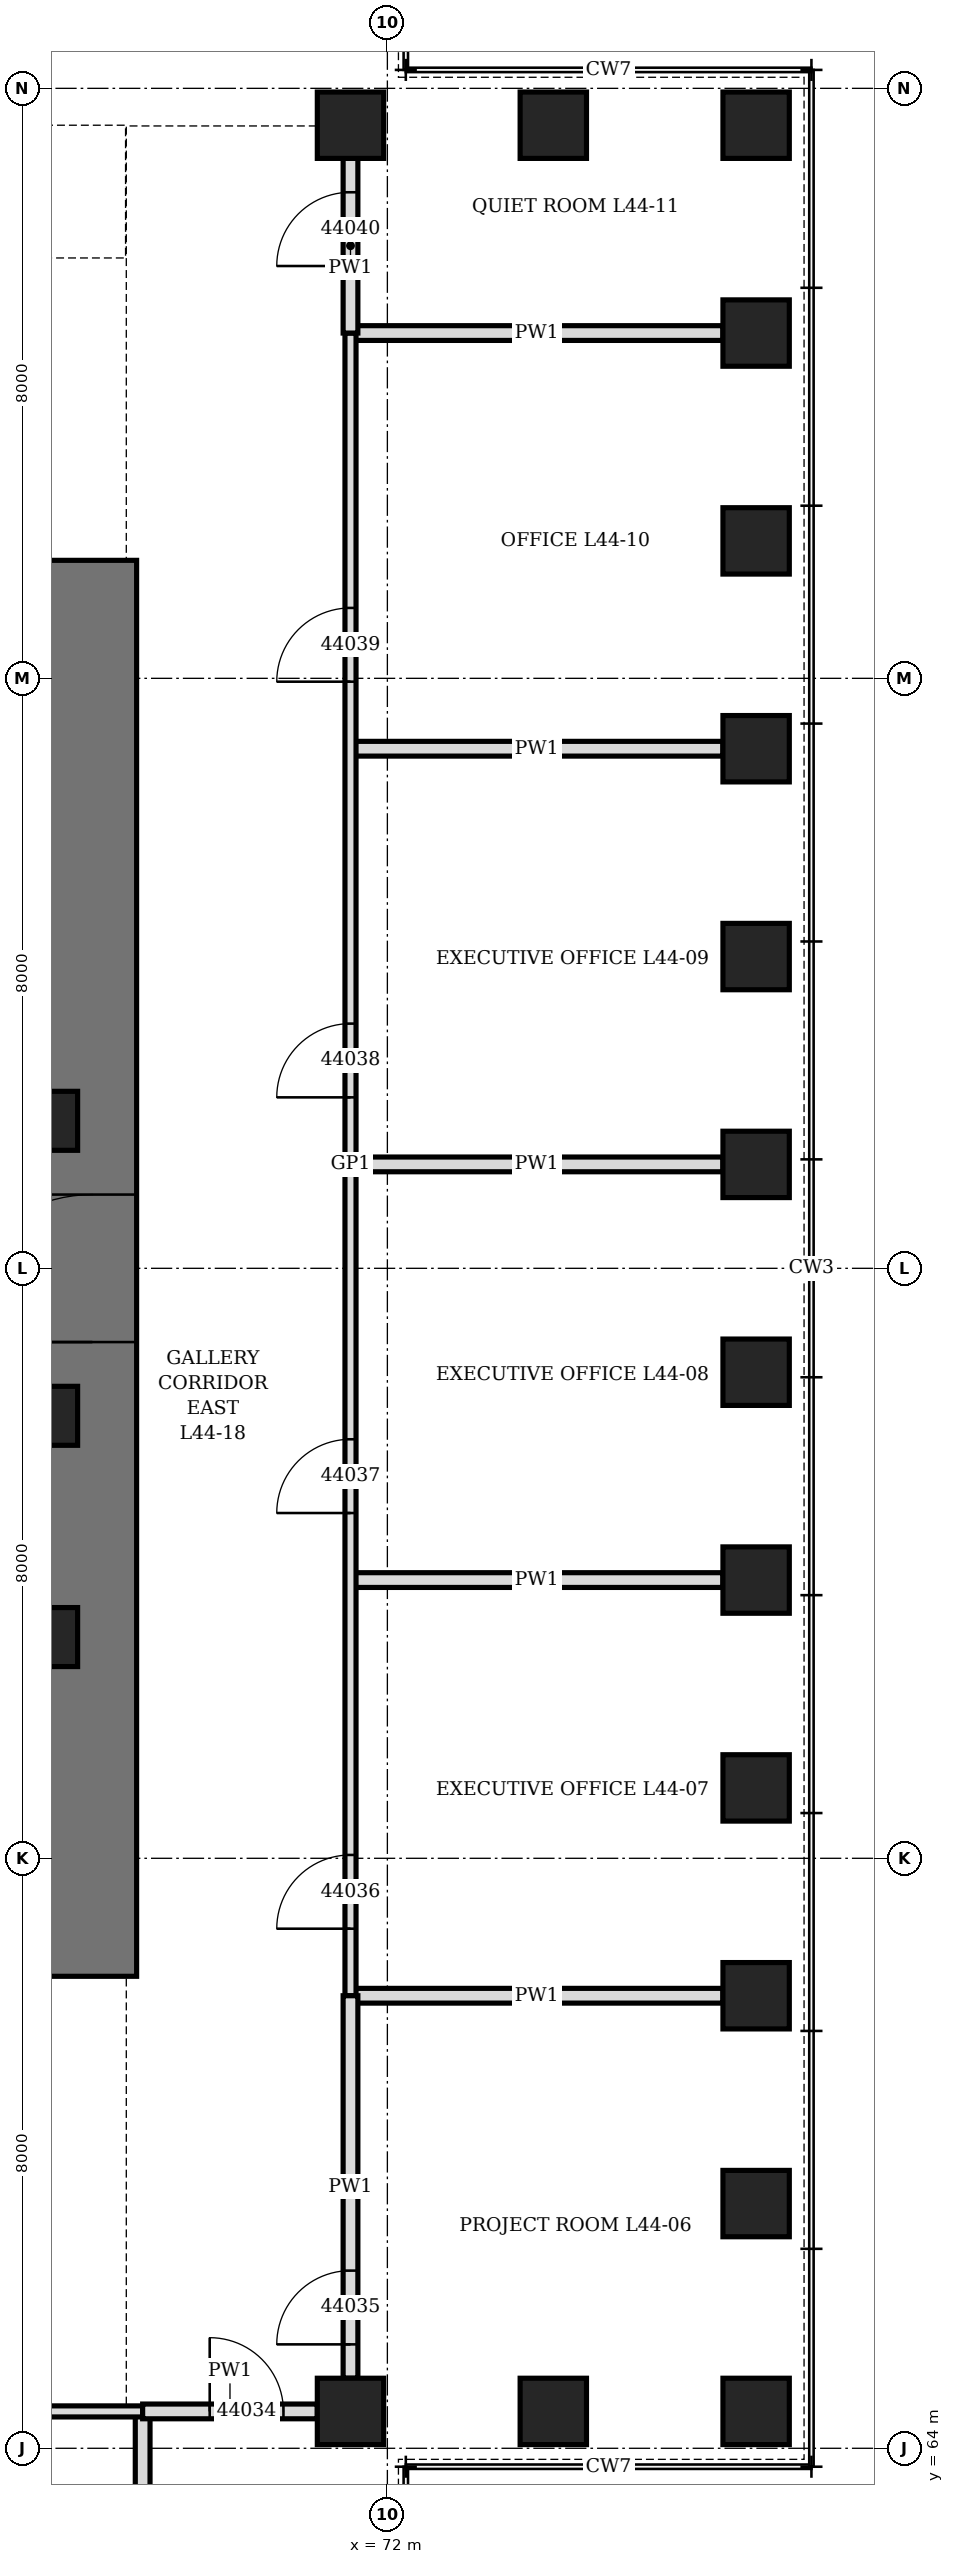
"""IFC4 building model, lengths in metres.
Left out: names, types, materials, properties, quantities, classifications, styles, units other than length and angle.
Written with IfcOpenShell. Run it as: python <this file> out.ifc"""

import sys

from ifc_helpers import new_model, si_unit, direction, frame, frame_2d, origin, origin_2d, place, context, subcontext, project, spatial, rectangle, hollow_rectangle, extrude, element, fill, save


model = new_model("IFC4")
c1 = context("Model", 3, precision=1e-05, world=origin(), true_north=direction((0.0, 1.0)))
c2 = subcontext(c1, "Body", "Model", "MODEL_VIEW")
j1 = project(units=[si_unit("LENGTHUNIT", "METRE"), si_unit("PLANEANGLEUNIT", "RADIAN")], contexts=[c1])
p1 = place(None, origin())
s1 = spatial("IfcSite", under=j1, at=p1, CompositionType="ELEMENT")
p2 = place(p1, origin())
s2 = spatial("IfcBuilding", under=s1, at=p2, CompositionType="ELEMENT")
p3 = place(p2, frame((0.0, 0.0, 198.1)))
s3 = spatial("IfcBuildingStorey", under=s2, at=p3, CompositionType="ELEMENT", Elevation=198.1)
for number, where, z_axis, x_axis in (
    (1, (71.5, 64.5, 0.0), (0.0, 0.0, 1.0), (1.0, 0.0, 0.0)),
    (2, (74.25, 64.5, 0.0), (0.0, 0.0, 1.0), (1.0, 0.0, 0.0)),
    (3, (77.0, 64.5, 0.0), (0.0, 0.0, 1.0), (0.0, 1.0, 0.0)),
    (4, (77.0, 67.318, 0.0), (0.0, 0.0, 1.0), (0.0, 1.0, 0.0)),
    (5, (77.0, 70.136, 0.0), (0.0, 0.0, 1.0), (0.0, 1.0, 0.0)),
    (6, (77.0, 72.955, 0.0), (0.0, 0.0, 1.0), (0.0, 1.0, 0.0)),
    (7, (77.0, 75.773, 0.0), (0.0, 0.0, 1.0), (0.0, 1.0, 0.0)),
    (8, (77.0, 78.591, 0.0), (0.0, 0.0, 1.0), (0.0, 1.0, 0.0)),
    (9, (77.0, 81.409, 0.0), (0.0, 0.0, 1.0), (0.0, 1.0, 0.0)),
    (10, (77.0, 84.227, 0.0), (0.0, 0.0, 1.0), (0.0, 1.0, 0.0)),
    (11, (77.0, 87.045, 0.0), (0.0, 0.0, 1.0), (0.0, 1.0, 0.0)),
    (12, (77.0, 89.864, 0.0), (0.0, 0.0, 1.0), (0.0, 1.0, 0.0)),
    (13, (77.0, 92.682, 0.0), (0.0, 0.0, 1.0), (0.0, 1.0, 0.0)),
    (14, (77.0, 95.5, 0.0), (0.0, 0.0, 1.0), (1.0, 0.0, 0.0)),
    (15, (74.25, 95.5, 0.0), (0.0, 0.0, 1.0), (1.0, 0.0, 0.0)),
    (16, (71.5, 95.5, 0.0), (0.0, 0.0, 1.0), (0.0, 1.0, 0.0)),
):
    element("IfcColumn", number, at=place(p3, frame(where, z_axis=z_axis, x_axis=x_axis)), inside=s3, PredefinedType="COLUMN", context=c2, shape_type="SweptSolid", body=[
        extrude(hollow_rectangle(XDim=0.9, YDim=0.9, WallThickness=0.12, at=origin_2d()), origin(), (0.0, 0.0, 1.0), 4.2),
    ])
p4 = place(p3, frame((68.0, 70.4, 0.0), z_axis=(0.0, 0.0, 1.0), x_axis=(0.0, 1.0, 0.0)))
e17 = element("IfcWall", 17, at=p4, inside=s3, PredefinedType="SHEAR", context=c2, shape_type="SweptSolid", body=[
    extrude(rectangle(XDim=19.2, YDim=1.2, at=frame_2d((9.6, 0.0))), origin(), (0.0, 0.0, 1.0), 4.2),
])
p5 = place(p4, frame((8.6, 0.0, 0.0)))
e18 = element("IfcOpeningElement", 18, at=p5, cuts=e17, PredefinedType="OPENING", context=c2, shape_type="SweptSolid", body=[
    extrude(rectangle(XDim=2.0, YDim=2.4, at=frame_2d((1.0, 1.2))), frame((0.0, 0.61, 0.0), z_axis=(0.0, -1.0, 0.0), x_axis=(1.0, 0.0, 0.0)), (0.0, 0.0, 1.0), 1.22),
])
for number, where, z_axis, x_axis in (
    (19, (67.4, 75.0, 0.0), (0.0, 0.0, 1.0), (1.0, 0.0, 0.0)),
    (20, (67.4, 78.0, 0.0), (0.0, 0.0, 1.0), (1.0, 0.0, 0.0)),
    (21, (67.4, 82.0, 0.0), (0.0, 0.0, 1.0), (1.0, 0.0, 0.0)),
):
    element("IfcColumn", number, at=place(p3, frame(where, z_axis=z_axis, x_axis=x_axis)), inside=s3, PredefinedType="COLUMN", context=c2, shape_type="SweptSolid", body=[
        extrude(hollow_rectangle(XDim=0.8, YDim=0.8, WallThickness=0.1, at=origin_2d()), origin(), (0.0, 0.0, 1.0), 4.2),
    ])
for number, where, z_axis, x_axis in (
    (22, (68.682, 59.45, 0.0), (0.0, 0.0, 1.0), (0.0, 1.0, 0.0)),
    (23, (71.5, 70.136, 0.0), (0.0, 0.0, 1.0), (1.0, 0.0, 0.0)),
    (24, (71.5, 75.773, 0.0), (0.0, 0.0, 1.0), (1.0, 0.0, 0.0)),
    (25, (71.5, 81.409, 0.0), (0.0, 0.0, 1.0), (1.0, 0.0, 0.0)),
    (26, (71.5, 87.045, 0.0), (0.0, 0.0, 1.0), (1.0, 0.0, 0.0)),
    (27, (71.5, 92.682, 0.0), (0.0, 0.0, 1.0), (1.0, 0.0, 0.0)),
):
    element("IfcWall", number, at=place(p3, frame(where, z_axis=z_axis, x_axis=x_axis)), inside=s3, PredefinedType="PARTITIONING", context=c2, shape_type="SweptSolid", body=[
        extrude(rectangle(XDim=5.05, YDim=0.2, at=frame_2d((2.525, 0.0))), origin(), (0.0, 0.0, 1.0), 3.428),
    ])
p6 = place(p3, frame((62.946, 64.5, 0.0), z_axis=(0.0, 0.0, 1.0), x_axis=(1.0, 0.0, 0.0)))
e28 = element("IfcWall", 28, at=p6, inside=s3, PredefinedType="PARTITIONING", context=c2, shape_type="SweptSolid", body=[
    extrude(rectangle(XDim=5.736, YDim=0.15, at=frame_2d((2.868, 0.0))), origin(), (0.0, 0.0, 1.0), 4.04),
])
p7 = place(p6, frame((1.009, 0.0, 0.0)))
e29 = element("IfcOpeningElement", 29, at=p7, cuts=e28, PredefinedType="OPENING", context=c2, shape_type="SweptSolid", body=[
    extrude(rectangle(XDim=1.0, YDim=2.1, at=frame_2d((0.5, 1.05))), frame((0.0, 0.085, 0.0), z_axis=(0.0, -1.0, 0.0), x_axis=(1.0, 0.0, 0.0)), (0.0, 0.0, 1.0), 0.17),
])
p8 = place(p3, frame((68.682, 64.5, 0.0), z_axis=(0.0, 0.0, 1.0), x_axis=(1.0, 0.0, 0.0)))
e30 = element("IfcWall", 30, at=p8, inside=s3, PredefinedType="PARTITIONING", context=c2, shape_type="SweptSolid", body=[
    extrude(rectangle(XDim=2.368, YDim=0.2, at=frame_2d((1.184, 0.0))), origin(), (0.0, 0.0, 1.0), 4.04),
])
p9 = place(p8, frame((0.909, 0.0, 0.0)))
e31 = element("IfcOpeningElement", 31, at=p9, cuts=e30, PredefinedType="OPENING", context=c2, shape_type="SweptSolid", body=[
    extrude(rectangle(XDim=1.0, YDim=2.1, at=frame_2d((0.5, 1.05))), frame((0.0, 0.11, 0.0), z_axis=(0.0, -1.0, 0.0), x_axis=(1.0, 0.0, 0.0)), (0.0, 0.0, 1.0), 0.22),
])
p10 = place(p3, frame((71.5, 70.136, 0.0), z_axis=(0.0, 0.0, 1.0), x_axis=(0.0, 1.0, 0.0)))
e32 = element("IfcWall", 32, at=p10, inside=s3, PredefinedType="PARTITIONING", context=c2, shape_type="SweptSolid", body=[
    extrude(rectangle(XDim=22.545, YDim=0.15, at=frame_2d((11.273, 0.0))), origin(), (0.0, 0.0, 1.0), 4.04),
])
p11 = place(p10, frame((0.909, 0.0, 0.0)))
e33 = element("IfcOpeningElement", 33, at=p11, cuts=e32, PredefinedType="OPENING", context=c2, shape_type="SweptSolid", body=[
    extrude(rectangle(XDim=1.0, YDim=2.1, at=frame_2d((0.5, 1.05))), frame((0.0, 0.085, 0.0), z_axis=(0.0, -1.0, 0.0), x_axis=(1.0, 0.0, 0.0)), (0.0, 0.0, 1.0), 0.17),
])
p12 = place(p10, frame((6.545, 0.0, 0.0)))
e34 = element("IfcOpeningElement", 34, at=p12, cuts=e32, PredefinedType="OPENING", context=c2, shape_type="SweptSolid", body=[
    extrude(rectangle(XDim=1.0, YDim=2.1, at=frame_2d((0.5, 1.05))), frame((0.0, 0.085, 0.0), z_axis=(0.0, -1.0, 0.0), x_axis=(1.0, 0.0, 0.0)), (0.0, 0.0, 1.0), 0.17),
])
p13 = place(p10, frame((12.182, 0.0, 0.0)))
e35 = element("IfcOpeningElement", 35, at=p13, cuts=e32, PredefinedType="OPENING", context=c2, shape_type="SweptSolid", body=[
    extrude(rectangle(XDim=1.0, YDim=2.1, at=frame_2d((0.5, 1.05))), frame((0.0, 0.085, 0.0), z_axis=(0.0, -1.0, 0.0), x_axis=(1.0, 0.0, 0.0)), (0.0, 0.0, 1.0), 0.17),
])
p14 = place(p10, frame((17.818, 0.0, 0.0)))
e36 = element("IfcOpeningElement", 36, at=p14, cuts=e32, PredefinedType="OPENING", context=c2, shape_type="SweptSolid", body=[
    extrude(rectangle(XDim=1.0, YDim=2.1, at=frame_2d((0.5, 1.05))), frame((0.0, 0.085, 0.0), z_axis=(0.0, -1.0, 0.0), x_axis=(1.0, 0.0, 0.0)), (0.0, 0.0, 1.0), 0.17),
])
p15 = place(p3, frame((71.5, 64.95, 0.0), z_axis=(0.0, 0.0, 1.0), x_axis=(0.0, 1.0, 0.0)))
e37 = element("IfcWall", 37, at=p15, inside=s3, PredefinedType="PARTITIONING", context=c2, shape_type="SweptSolid", body=[
    extrude(rectangle(XDim=5.187, YDim=0.2, at=frame_2d((2.593, 0.0))), origin(), (0.0, 0.0, 1.0), 4.04),
])
p16 = place(p15, frame((0.459, 0.0, 0.0)))
e38 = element("IfcOpeningElement", 38, at=p16, cuts=e37, PredefinedType="OPENING", context=c2, shape_type="SweptSolid", body=[
    extrude(rectangle(XDim=1.0, YDim=2.1, at=frame_2d((0.5, 1.05))), frame((0.0, 0.11, 0.0), z_axis=(0.0, -1.0, 0.0), x_axis=(1.0, 0.0, 0.0)), (0.0, 0.0, 1.0), 0.22),
])
p17 = place(p3, frame((71.5, 92.682, 0.0), z_axis=(0.0, 0.0, 1.0), x_axis=(0.0, 1.0, 0.0)))
e39 = element("IfcWall", 39, at=p17, inside=s3, PredefinedType="PARTITIONING", context=c2, shape_type="SweptSolid", body=[
    extrude(rectangle(XDim=2.368, YDim=0.2, at=frame_2d((1.184, 0.0))), origin(), (0.0, 0.0, 1.0), 4.04),
])
p18 = place(p17, frame((0.909, 0.0, 0.0)))
e40 = element("IfcOpeningElement", 40, at=p18, cuts=e39, PredefinedType="OPENING", context=c2, shape_type="SweptSolid", body=[
    extrude(rectangle(XDim=1.0, YDim=2.1, at=frame_2d((0.5, 1.05))), frame((0.0, 0.11, 0.0), z_axis=(0.0, -1.0, 0.0), x_axis=(1.0, 0.0, 0.0)), (0.0, 0.0, 1.0), 0.22),
])
p19 = place(p5, origin())
e41 = element("IfcDoor", 41, at=p19, inside=s3, OperationType="DOUBLE_DOOR_SINGLE_SWING", PredefinedType="DOOR", context=c2, shape_type="SweptSolid", body=[
    extrude(rectangle(XDim=2.0, YDim=2.4, at=frame_2d((1.0, 1.2))), frame((0.0, 0.35, 0.0), z_axis=(0.0, -1.0, 0.0), x_axis=(1.0, 0.0, 0.0)), (0.0, 0.0, 1.0), 0.7),
])
fill(e18, e41)
p20 = place(p9, origin())
e42 = element("IfcDoor", 42, at=p20, inside=s3, OperationType="SINGLE_SWING_LEFT", PredefinedType="DOOR", context=c2, shape_type="SweptSolid", body=[
    extrude(rectangle(XDim=1.0, YDim=2.1, at=frame_2d((0.5, 1.05))), frame((0.0, 0.1, 0.0), z_axis=(0.0, -1.0, 0.0), x_axis=(1.0, 0.0, 0.0)), (0.0, 0.0, 1.0), 0.199),
])
fill(e31, e42)
p21 = place(p16, origin())
e43 = element("IfcDoor", 43, at=p21, inside=s3, OperationType="SINGLE_SWING_LEFT", PredefinedType="DOOR", context=c2, shape_type="SweptSolid", body=[
    extrude(rectangle(XDim=1.0, YDim=2.1, at=frame_2d((0.5, 1.05))), frame((0.0, 0.1, 0.0), z_axis=(0.0, -1.0, 0.0), x_axis=(1.0, 0.0, 0.0)), (0.0, 0.0, 1.0), 0.199),
])
fill(e38, e43)
p22 = place(p11, origin())
e44 = element("IfcDoor", 44, at=p22, inside=s3, OperationType="SINGLE_SWING_LEFT", PredefinedType="DOOR", context=c2, shape_type="SweptSolid", body=[
    extrude(rectangle(XDim=1.0, YDim=2.1, at=frame_2d((0.5, 1.05))), frame((0.0, 0.075, 0.0), z_axis=(0.0, -1.0, 0.0), x_axis=(1.0, 0.0, 0.0)), (0.0, 0.0, 1.0), 0.149),
])
fill(e33, e44)
p23 = place(p12, origin())
e45 = element("IfcDoor", 45, at=p23, inside=s3, OperationType="SINGLE_SWING_LEFT", PredefinedType="DOOR", context=c2, shape_type="SweptSolid", body=[
    extrude(rectangle(XDim=1.0, YDim=2.1, at=frame_2d((0.5, 1.05))), frame((0.0, 0.075, 0.0), z_axis=(0.0, -1.0, 0.0), x_axis=(1.0, 0.0, 0.0)), (0.0, 0.0, 1.0), 0.149),
])
fill(e34, e45)
p24 = place(p13, origin())
e46 = element("IfcDoor", 46, at=p24, inside=s3, OperationType="SINGLE_SWING_LEFT", PredefinedType="DOOR", context=c2, shape_type="SweptSolid", body=[
    extrude(rectangle(XDim=1.0, YDim=2.1, at=frame_2d((0.5, 1.05))), frame((0.0, 0.075, 0.0), z_axis=(0.0, -1.0, 0.0), x_axis=(1.0, 0.0, 0.0)), (0.0, 0.0, 1.0), 0.149),
])
fill(e35, e46)
p25 = place(p14, origin())
e47 = element("IfcDoor", 47, at=p25, inside=s3, OperationType="SINGLE_SWING_LEFT", PredefinedType="DOOR", context=c2, shape_type="SweptSolid", body=[
    extrude(rectangle(XDim=1.0, YDim=2.1, at=frame_2d((0.5, 1.05))), frame((0.0, 0.075, 0.0), z_axis=(0.0, -1.0, 0.0), x_axis=(1.0, 0.0, 0.0)), (0.0, 0.0, 1.0), 0.149),
])
fill(e36, e47)
p26 = place(p18, origin())
e48 = element("IfcDoor", 48, at=p26, inside=s3, OperationType="SINGLE_SWING_LEFT", PredefinedType="DOOR", context=c2, shape_type="SweptSolid", body=[
    extrude(rectangle(XDim=1.0, YDim=2.1, at=frame_2d((0.5, 1.05))), frame((0.0, 0.1, 0.0), z_axis=(0.0, -1.0, 0.0), x_axis=(1.0, 0.0, 0.0)), (0.0, 0.0, 1.0), 0.199),
])
fill(e40, e48)
save(model, sys.argv[1])
